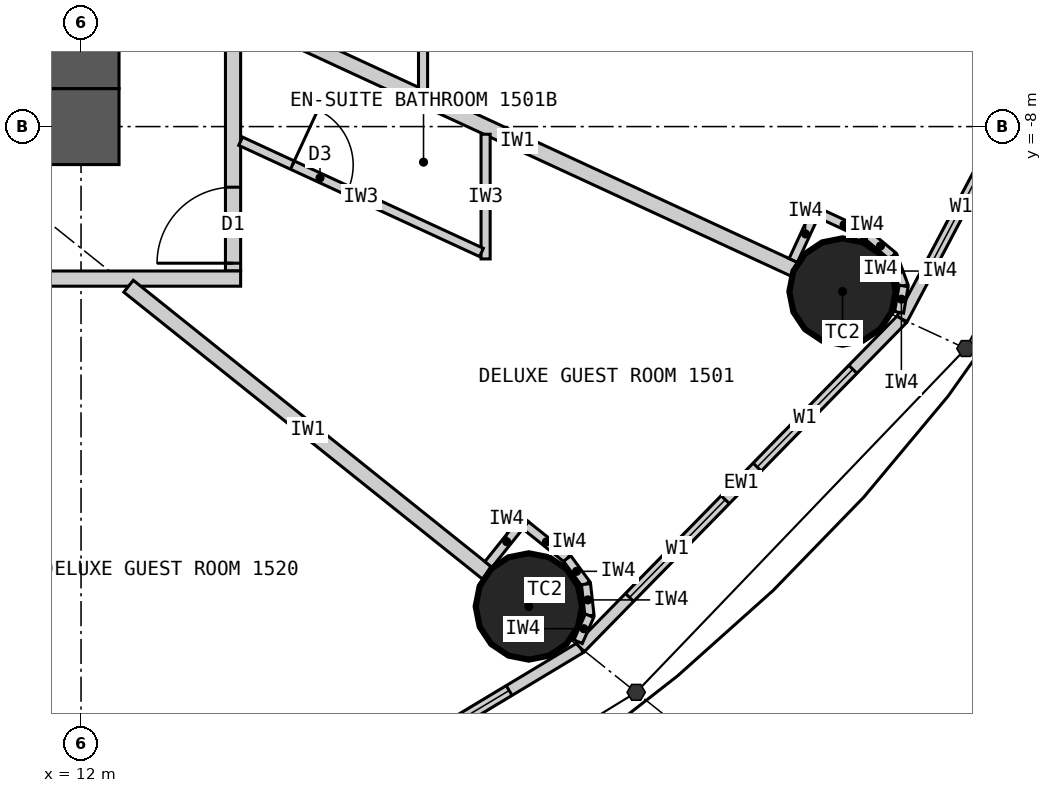
"""IFC4 building model, lengths in metres.
Left out: names, types, materials, properties, quantities, classifications, styles, units other than length and angle.
Written with IfcOpenShell. Run it as: python <this file> out.ifc"""

import sys

from ifc_helpers import new_model, si_unit, direction, frame, frame_2d, origin, origin_2d, place, context, subcontext, project, spatial, rectangle, circle, extrude, element, fill, save


model = new_model("IFC4")
c1 = context("Model", 3, precision=1e-05, world=origin(), true_north=direction((0.0, 1.0)))
c2 = subcontext(c1, "Body", "Model", "MODEL_VIEW")
j1 = project(units=[si_unit("LENGTHUNIT", "METRE"), si_unit("PLANEANGLEUNIT", "RADIAN")], contexts=[c1])
p1 = place(None, origin())
s1 = spatial("IfcSite", under=j1, at=p1, CompositionType="ELEMENT")
p2 = place(p1, origin())
s2 = spatial("IfcBuilding", under=s1, at=p2, CompositionType="ELEMENT")
p3 = place(p2, frame((0.0, 0.0, 63.9)))
s3 = spatial("IfcBuildingStorey", under=s2, at=p3, CompositionType="ELEMENT", Elevation=63.9)
for number, where, z_axis, x_axis in (
    (1, (17.892, -14.313, 0.0), (0.0, 0.0, 1.0), (1.0, 0.0, 0.0)),
    (2, (22.019, -10.17, 0.0), (0.0, 0.0, 1.0), (1.0, 0.0, 0.0)),
):
    element("IfcColumn", number, at=place(p3, frame(where, z_axis=z_axis, x_axis=x_axis)), inside=s3, PredefinedType="COLUMN", context=c2, shape_type="SweptSolid", body=[
        extrude(circle(Radius=0.7, at=origin_2d()), origin(), (0.0, 0.0, 1.0), 3.3),
    ])
p4 = place(p3, frame((12.5, -8.0, 0.0), z_axis=(0.0, 0.0, 1.0), x_axis=(-1.0, 0.0, 0.0)))
e3 = element("IfcWall", 3, at=p4, inside=s3, PredefinedType="SHEAR", context=c2, shape_type="SweptSolid", body=[
    extrude(rectangle(XDim=25.0, YDim=1.0, at=frame_2d((12.5, 0.0))), origin(), (0.0, 0.0, 1.0), 3.3),
])
p5 = place(p4, frame((11.2, 0.0, 0.0)))
e4 = element("IfcOpeningElement", 4, at=p5, cuts=e3, PredefinedType="OPENING", context=c2, shape_type="SweptSolid", body=[
    extrude(rectangle(XDim=1.2, YDim=2.2, at=frame_2d((0.6, 1.1))), frame((0.0, 0.51, 0.0), z_axis=(0.0, -1.0, 0.0), x_axis=(1.0, 0.0, 0.0)), (0.0, 0.0, 1.0), 1.02),
])
p6 = place(p4, frame((18.8, 0.0, 0.0)))
e5 = element("IfcOpeningElement", 5, at=p6, cuts=e3, PredefinedType="OPENING", context=c2, shape_type="SweptSolid", body=[
    extrude(rectangle(XDim=0.9, YDim=2.2, at=frame_2d((0.45, 1.1))), frame((0.0, 0.51, 0.0), z_axis=(0.0, -1.0, 0.0), x_axis=(1.0, 0.0, 0.0)), (0.0, 0.0, 1.0), 1.02),
])
p7 = place(p3, frame((12.0, -7.5, 0.0), z_axis=(0.0, 0.0, 1.0), x_axis=(0.0, 1.0, 0.0)))
e6 = element("IfcWall", 6, at=p7, inside=s3, PredefinedType="SHEAR", context=c2, shape_type="SweptSolid", body=[
    extrude(rectangle(XDim=15.0, YDim=1.0, at=frame_2d((7.5, 0.0))), origin(), (0.0, 0.0, 1.0), 3.3),
])
p8 = place(p7, frame((6.6, 0.0, 0.0)))
e7 = element("IfcOpeningElement", 7, at=p8, cuts=e6, PredefinedType="OPENING", context=c2, shape_type="SweptSolid", body=[
    extrude(rectangle(XDim=1.8, YDim=2.2, at=frame_2d((0.9, 1.1))), frame((0.0, 0.51, 0.0), z_axis=(0.0, -1.0, 0.0), x_axis=(1.0, 0.0, 0.0)), (0.0, 0.0, 1.0), 1.02),
])
p9 = place(p3, frame((13.096, -18.147, 0.0), z_axis=(0.0, 0.0, 1.0), x_axis=(0.856983180864, 0.515344377787, 0.0)))
e8 = element("IfcWall", 8, at=p9, inside=s3, PredefinedType="ELEMENTEDWALL", context=c2, shape_type="SweptSolid", body=[
    extrude(rectangle(XDim=6.386, YDim=0.15, at=frame_2d((3.193, 0.0))), origin(), (0.0, 0.0, 1.0), 3.12),
])
p10 = place(p9, frame((1.093, 0.0, 0.9)))
e9 = element("IfcOpeningElement", 9, at=p10, cuts=e8, PredefinedType="OPENING", context=c2, shape_type="SweptSolid", body=[
    extrude(rectangle(XDim=1.8, YDim=1.9, at=frame_2d((0.9, 0.95))), frame((0.0, 0.085, 0.0), z_axis=(0.0, -1.0, 0.0), x_axis=(1.0, 0.0, 0.0)), (0.0, 0.0, 1.0), 0.17),
])
p11 = place(p9, frame((3.493, 0.0, 0.9)))
e10 = element("IfcOpeningElement", 10, at=p11, cuts=e8, PredefinedType="OPENING", context=c2, shape_type="SweptSolid", body=[
    extrude(rectangle(XDim=1.8, YDim=1.9, at=frame_2d((0.9, 0.95))), frame((0.0, 0.085, 0.0), z_axis=(0.0, -1.0, 0.0), x_axis=(1.0, 0.0, 0.0)), (0.0, 0.0, 1.0), 0.17),
])
p12 = place(p3, frame((18.57, -14.856, 0.0), z_axis=(0.0, 0.0, 1.0), x_axis=(0.699602905915, 0.714531856557, 0.0)))
e11 = element("IfcWall", 11, at=p12, inside=s3, PredefinedType="ELEMENTEDWALL", context=c2, shape_type="SweptSolid", body=[
    extrude(rectangle(XDim=6.051, YDim=0.15, at=frame_2d((3.025, 0.0))), origin(), (0.0, 0.0, 1.0), 3.12),
])
p13 = place(p12, frame((0.926, 0.0, 0.9)))
e12 = element("IfcOpeningElement", 12, at=p13, cuts=e11, PredefinedType="OPENING", context=c2, shape_type="SweptSolid", body=[
    extrude(rectangle(XDim=1.8, YDim=1.9, at=frame_2d((0.9, 0.95))), frame((0.0, 0.085, 0.0), z_axis=(0.0, -1.0, 0.0), x_axis=(1.0, 0.0, 0.0)), (0.0, 0.0, 1.0), 0.17),
])
p14 = place(p12, frame((3.325, 0.0, 0.9)))
e13 = element("IfcOpeningElement", 13, at=p14, cuts=e11, PredefinedType="OPENING", context=c2, shape_type="SweptSolid", body=[
    extrude(rectangle(XDim=1.8, YDim=1.9, at=frame_2d((0.9, 0.95))), frame((0.0, 0.085, 0.0), z_axis=(0.0, -1.0, 0.0), x_axis=(1.0, 0.0, 0.0)), (0.0, 0.0, 1.0), 0.17),
])
p15 = place(p3, frame((22.803, -10.532, 0.0), z_axis=(0.0, 0.0, 1.0), x_axis=(0.467296867008, 0.884100468321, 0.0)))
e14 = element("IfcWall", 14, at=p15, inside=s3, PredefinedType="ELEMENTEDWALL", context=c2, shape_type="SweptSolid", body=[
    extrude(rectangle(XDim=5.734, YDim=0.15, at=frame_2d((2.867, 0.0))), origin(), (0.0, 0.0, 1.0), 3.12),
])
p16 = place(p15, frame((0.767, 0.0, 0.9)))
e15 = element("IfcOpeningElement", 15, at=p16, cuts=e14, PredefinedType="OPENING", context=c2, shape_type="SweptSolid", body=[
    extrude(rectangle(XDim=1.8, YDim=1.9, at=frame_2d((0.9, 0.95))), frame((0.0, 0.085, 0.0), z_axis=(0.0, -1.0, 0.0), x_axis=(1.0, 0.0, 0.0)), (0.0, 0.0, 1.0), 0.17),
])
p17 = place(p15, frame((3.167, 0.0, 0.9)))
e16 = element("IfcOpeningElement", 16, at=p17, cuts=e14, PredefinedType="OPENING", context=c2, shape_type="SweptSolid", body=[
    extrude(rectangle(XDim=1.8, YDim=1.9, at=frame_2d((0.9, 0.95))), frame((0.0, 0.085, 0.0), z_axis=(0.0, -1.0, 0.0), x_axis=(1.0, 0.0, 0.0)), (0.0, 0.0, 1.0), 0.17),
])
p18 = place(p3, frame((14.0, -9.9, 0.0), z_axis=(0.0, 0.0, 1.0), x_axis=(0.0, 1.0, 0.0)))
e17 = element("IfcWall", 17, at=p18, inside=s3, PredefinedType="PARTITIONING", context=c2, shape_type="SweptSolid", body=[
    extrude(rectangle(XDim=19.8, YDim=0.2, at=frame_2d((9.9, 0.0))), origin(), (0.0, 0.0, 1.0), 3.12),
])
p19 = place(p18, frame((0.103, 0.0, 0.0)))
e18 = element("IfcOpeningElement", 18, at=p19, cuts=e17, PredefinedType="OPENING", context=c2, shape_type="SweptSolid", body=[
    extrude(rectangle(XDim=1.0, YDim=2.2, at=frame_2d((0.5, 1.1))), frame((0.0, 0.11, 0.0), z_axis=(0.0, -1.0, 0.0), x_axis=(1.0, 0.0, 0.0)), (0.0, 0.0, 1.0), 0.22),
])
p20 = place(p18, frame((5.248, 0.0, 0.0)))
e19 = element("IfcOpeningElement", 19, at=p20, cuts=e17, PredefinedType="OPENING", context=c2, shape_type="SweptSolid", body=[
    extrude(rectangle(XDim=1.0, YDim=2.2, at=frame_2d((0.5, 1.1))), frame((0.0, 0.11, 0.0), z_axis=(0.0, -1.0, 0.0), x_axis=(1.0, 0.0, 0.0)), (0.0, 0.0, 1.0), 0.22),
])
p21 = place(p18, frame((8.438, 0.0, 0.0)))
e20 = element("IfcOpeningElement", 20, at=p21, cuts=e17, PredefinedType="OPENING", context=c2, shape_type="SweptSolid", body=[
    extrude(rectangle(XDim=1.0, YDim=2.2, at=frame_2d((0.5, 1.1))), frame((0.0, 0.11, 0.0), z_axis=(0.0, -1.0, 0.0), x_axis=(1.0, 0.0, 0.0)), (0.0, 0.0, 1.0), 0.22),
])
p22 = place(p18, frame((14.532, 0.0, 0.0)))
e21 = element("IfcOpeningElement", 21, at=p22, cuts=e17, PredefinedType="OPENING", context=c2, shape_type="SweptSolid", body=[
    extrude(rectangle(XDim=1.0, YDim=2.2, at=frame_2d((0.5, 1.1))), frame((0.0, 0.11, 0.0), z_axis=(0.0, -1.0, 0.0), x_axis=(1.0, 0.0, 0.0)), (0.0, 0.0, 1.0), 0.22),
])
p23 = place(p3, frame((14.1, -10.0, 0.0), z_axis=(0.0, 0.0, 1.0), x_axis=(-1.0, 0.0, 0.0)))
e22 = element("IfcWall", 22, at=p23, inside=s3, PredefinedType="PARTITIONING", context=c2, shape_type="SweptSolid", body=[
    extrude(rectangle(XDim=28.2, YDim=0.2, at=frame_2d((14.1, 0.0))), origin(), (0.0, 0.0, 1.0), 3.12),
])
p24 = place(p23, frame((23.865, 0.0, 0.0)))
e23 = element("IfcOpeningElement", 23, at=p24, cuts=e22, PredefinedType="OPENING", context=c2, shape_type="SweptSolid", body=[
    extrude(rectangle(XDim=1.0, YDim=2.2, at=frame_2d((0.5, 1.1))), frame((0.0, 0.11, 0.0), z_axis=(0.0, -1.0, 0.0), x_axis=(1.0, 0.0, 0.0)), (0.0, 0.0, 1.0), 0.22),
])
p25 = place(p23, frame((18.529, 0.0, 0.0)))
e24 = element("IfcOpeningElement", 24, at=p25, cuts=e22, PredefinedType="OPENING", context=c2, shape_type="SweptSolid", body=[
    extrude(rectangle(XDim=1.0, YDim=2.2, at=frame_2d((0.5, 1.1))), frame((0.0, 0.11, 0.0), z_axis=(0.0, -1.0, 0.0), x_axis=(1.0, 0.0, 0.0)), (0.0, 0.0, 1.0), 0.22),
])
p26 = place(p23, frame((14.623, 0.0, 0.0)))
e25 = element("IfcOpeningElement", 25, at=p26, cuts=e22, PredefinedType="OPENING", context=c2, shape_type="SweptSolid", body=[
    extrude(rectangle(XDim=1.0, YDim=2.2, at=frame_2d((0.5, 1.1))), frame((0.0, 0.11, 0.0), z_axis=(0.0, -1.0, 0.0), x_axis=(1.0, 0.0, 0.0)), (0.0, 0.0, 1.0), 0.22),
])
p27 = place(p23, frame((11.24, 0.0, 0.0)))
e26 = element("IfcOpeningElement", 26, at=p27, cuts=e22, PredefinedType="OPENING", context=c2, shape_type="SweptSolid", body=[
    extrude(rectangle(XDim=1.0, YDim=2.2, at=frame_2d((0.5, 1.1))), frame((0.0, 0.11, 0.0), z_axis=(0.0, -1.0, 0.0), x_axis=(1.0, 0.0, 0.0)), (0.0, 0.0, 1.0), 0.22),
])
p28 = place(p23, frame((8.671, 0.0, 0.0)))
e27 = element("IfcOpeningElement", 27, at=p28, cuts=e22, PredefinedType="OPENING", context=c2, shape_type="SweptSolid", body=[
    extrude(rectangle(XDim=1.0, YDim=2.2, at=frame_2d((0.5, 1.1))), frame((0.0, 0.11, 0.0), z_axis=(0.0, -1.0, 0.0), x_axis=(1.0, 0.0, 0.0)), (0.0, 0.0, 1.0), 0.22),
])
p29 = place(p23, frame((2.801, 0.0, 0.0)))
e28 = element("IfcOpeningElement", 28, at=p29, cuts=e22, PredefinedType="OPENING", context=c2, shape_type="SweptSolid", body=[
    extrude(rectangle(XDim=1.0, YDim=2.2, at=frame_2d((0.5, 1.1))), frame((0.0, 0.11, 0.0), z_axis=(0.0, -1.0, 0.0), x_axis=(1.0, 0.0, 0.0)), (0.0, 0.0, 1.0), 0.22),
])
p30 = place(p3, frame((7.289, -10.1, 0.0), z_axis=(0.0, 0.0, 1.0), x_axis=(0.585198353053, -0.810890182197, 0.0)))
e29 = element("IfcWall", 29, at=p30, inside=s3, PredefinedType="PARTITIONING", context=c2, shape_type="SweptSolid", body=[
    extrude(rectangle(XDim=8.36, YDim=0.2, at=frame_2d((4.18, 0.0))), origin(), (0.0, 0.0, 1.0), 2.32),
])
p31 = place(p3, frame((12.625, -10.1, 0.0), z_axis=(0.0, 0.0, 1.0), x_axis=(0.780892451574, -0.624665493744, 0.0)))
e30 = element("IfcWall", 30, at=p31, inside=s3, PredefinedType="PARTITIONING", context=c2, shape_type="SweptSolid", body=[
    extrude(rectangle(XDim=6.045, YDim=0.2, at=frame_2d((3.022, 0.0))), origin(), (0.0, 0.0, 1.0), 2.32),
])
p32 = place(p3, frame((14.1, -6.512, 0.0), z_axis=(0.0, 0.0, 1.0), x_axis=(0.907832871056, -0.419332181247, 0.0)))
e31 = element("IfcWall", 31, at=p32, inside=s3, PredefinedType="PARTITIONING", context=c2, shape_type="SweptSolid", body=[
    extrude(rectangle(XDim=8.023, YDim=0.2, at=frame_2d((4.011, 0.0))), origin(), (0.0, 0.0, 1.0), 2.32),
])
p33 = place(p3, frame((17.323, -8.101, 0.0), z_axis=(0.0, 0.0, 1.0), x_axis=(0.0, -1.0, 0.0)))
e32 = element("IfcWall", 32, at=p33, inside=s3, PredefinedType="PARTITIONING", context=c2, shape_type="SweptSolid", body=[
    extrude(rectangle(XDim=1.64, YDim=0.12, at=frame_2d((0.82, 0.0))), origin(), (0.0, 0.0, 1.0), 3.12),
])
p34 = place(p3, frame((14.1, -8.193, 0.0), z_axis=(0.0, 0.0, 1.0), x_axis=(0.907836493557, -0.419324338628, 0.0)))
e33 = element("IfcWall", 33, at=p34, inside=s3, PredefinedType="PARTITIONING", context=c2, shape_type="SweptSolid", body=[
    extrude(rectangle(XDim=3.49, YDim=0.12, at=frame_2d((1.745, 0.0))), origin(), (0.0, 0.0, 1.0), 3.12),
])
p35 = place(p34, frame((0.75, 0.0, 0.0)))
e34 = element("IfcOpeningElement", 34, at=p35, cuts=e33, PredefinedType="OPENING", context=c2, shape_type="SweptSolid", body=[
    extrude(rectangle(XDim=0.8, YDim=2.1, at=frame_2d((0.4, 1.05))), frame((0.0, 0.07, 0.0), z_axis=(0.0, -1.0, 0.0), x_axis=(1.0, 0.0, 0.0)), (0.0, 0.0, 1.0), 0.14),
])
p36 = place(p3, frame((16.5, -7.521, 0.0), z_axis=(0.0, 0.0, 1.0), x_axis=(0.0, 1.0, 0.0)))
e35 = element("IfcWall", 35, at=p36, inside=s3, PredefinedType="PARTITIONING", context=c2, shape_type="SweptSolid", body=[
    extrude(rectangle(XDim=2.749, YDim=0.12, at=frame_2d((1.374, 0.0))), origin(), (0.0, 0.0, 1.0), 3.12),
])
p37 = place(p3, frame((17.361, -13.76, 0.0), z_axis=(0.0, 0.0, 1.0), x_axis=(0.624501042889, 0.781023973659, 0.0)))
e36 = element("IfcWall", 36, at=p37, inside=s3, PredefinedType="PARTITIONING", context=c2, shape_type="SweptSolid", body=[
    extrude(rectangle(XDim=0.767, YDim=0.12, at=frame_2d((0.384, 0.0))), origin(), (0.0, 0.0, 1.0), 3.12),
])
p38 = place(p3, frame((17.85, -13.246, 0.0), z_axis=(0.0, 0.0, 1.0), x_axis=(0.780902834923, -0.62465251333, 0.0)))
e37 = element("IfcWall", 37, at=p38, inside=s3, PredefinedType="PARTITIONING", context=c2, shape_type="SweptSolid", body=[
    extrude(rectangle(XDim=0.7, YDim=0.12, at=frame_2d((0.35, 0.0))), origin(), (0.0, 0.0, 1.0), 3.12),
])
for number, where, z_axis, x_axis in (
    (38, (18.396, -13.683, 0.0), (0.0, 0.0, 1.0), (0.592, -0.806, 0.0)),
    (39, (18.644, -14.02, 0.0), (0.0, 0.0, 1.0), (0.11, -0.994, 0.0)),
):
    element("IfcWall", number, at=place(p3, frame(where, z_axis=z_axis, x_axis=x_axis)), inside=s3, PredefinedType="PARTITIONING", context=c2, shape_type="SweptSolid", body=[
        extrude(rectangle(XDim=0.418, YDim=0.12, at=frame_2d((0.209, 0.0))), origin(), (0.0, 0.0, 1.0), 3.12),
    ])
p39 = place(p3, frame((18.69, -14.435, 0.0), z_axis=(0.0, 0.0, 1.0), x_axis=(-0.401093412634, -0.91603715773, 0.0)))
e40 = element("IfcWall", 40, at=p39, inside=s3, PredefinedType="PARTITIONING", context=c2, shape_type="SweptSolid", body=[
    extrude(rectangle(XDim=0.373, YDim=0.12, at=frame_2d((0.187, 0.0))), origin(), (0.0, 0.0, 1.0), 3.12),
])
p40 = place(p3, frame((21.371, -9.761, 0.0), z_axis=(0.0, 0.0, 1.0), x_axis=(0.419259891039, 0.907866258744, 0.0)))
e41 = element("IfcWall", 41, at=p40, inside=s3, PredefinedType="PARTITIONING", context=c2, shape_type="SweptSolid", body=[
    extrude(rectangle(XDim=0.768, YDim=0.12, at=frame_2d((0.384, 0.0))), origin(), (0.0, 0.0, 1.0), 3.12),
])
p41 = place(p3, frame((21.722, -9.144, 0.0), z_axis=(0.0, 0.0, 1.0), x_axis=(0.907877701396, -0.419235112208, 0.0)))
e42 = element("IfcWall", 42, at=p41, inside=s3, PredefinedType="PARTITIONING", context=c2, shape_type="SweptSolid", body=[
    extrude(rectangle(XDim=0.7, YDim=0.12, at=frame_2d((0.35, 0.0))), origin(), (0.0, 0.0, 1.0), 3.12),
])
p42 = place(p3, frame((22.358, -9.437, 0.0), z_axis=(0.0, 0.0, 1.0), x_axis=(0.768412687942, -0.639954639806, 0.0)))
e43 = element("IfcWall", 43, at=p42, inside=s3, PredefinedType="PARTITIONING", context=c2, shape_type="SweptSolid", body=[
    extrude(rectangle(XDim=0.418, YDim=0.12, at=frame_2d((0.209, 0.0))), origin(), (0.0, 0.0, 1.0), 3.12),
])
p43 = place(p3, frame((22.679, -9.705, 0.0), z_axis=(0.0, 0.0, 1.0), x_axis=(0.345164001646, -0.938542386879, 0.0)))
e44 = element("IfcWall", 44, at=p43, inside=s3, PredefinedType="PARTITIONING", context=c2, shape_type="SweptSolid", body=[
    extrude(rectangle(XDim=0.418, YDim=0.12, at=frame_2d((0.209, 0.0))), origin(), (0.0, 0.0, 1.0), 3.12),
])
p44 = place(p3, frame((22.823, -10.097, 0.0), z_axis=(0.0, 0.0, 1.0), x_axis=(-0.169674995186, -0.985500074079, 0.0)))
e45 = element("IfcWall", 45, at=p44, inside=s3, PredefinedType="PARTITIONING", context=c2, shape_type="SweptSolid", body=[
    extrude(rectangle(XDim=0.353, YDim=0.12, at=frame_2d((0.176, 0.0))), origin(), (0.0, 0.0, 1.0), 3.12),
])
p45 = place(p11, origin())
e46 = element("IfcWindow", 46, at=p45, inside=s3, PartitioningType="SINGLE_PANEL", PredefinedType="WINDOW", context=c2, shape_type="SweptSolid", body=[
    extrude(rectangle(XDim=1.8, YDim=1.9, at=frame_2d((0.9, 0.95))), frame((0.0, 0.03, 0.0), z_axis=(0.0, -1.0, 0.0), x_axis=(1.0, 0.0, 0.0)), (0.0, 0.0, 1.0), 0.06),
])
fill(e10, e46)
p46 = place(p13, origin())
e47 = element("IfcWindow", 47, at=p46, inside=s3, PartitioningType="SINGLE_PANEL", PredefinedType="WINDOW", context=c2, shape_type="SweptSolid", body=[
    extrude(rectangle(XDim=1.8, YDim=1.9, at=frame_2d((0.9, 0.95))), frame((0.0, 0.03, 0.0), z_axis=(0.0, -1.0, 0.0), x_axis=(1.0, 0.0, 0.0)), (0.0, 0.0, 1.0), 0.06),
])
fill(e12, e47)
p47 = place(p14, origin())
e48 = element("IfcWindow", 48, at=p47, inside=s3, PartitioningType="SINGLE_PANEL", PredefinedType="WINDOW", context=c2, shape_type="SweptSolid", body=[
    extrude(rectangle(XDim=1.8, YDim=1.9, at=frame_2d((0.9, 0.95))), frame((0.0, 0.03, 0.0), z_axis=(0.0, -1.0, 0.0), x_axis=(1.0, 0.0, 0.0)), (0.0, 0.0, 1.0), 0.06),
])
fill(e13, e48)
p48 = place(p16, origin())
e49 = element("IfcWindow", 49, at=p48, inside=s3, PartitioningType="SINGLE_PANEL", PredefinedType="WINDOW", context=c2, shape_type="SweptSolid", body=[
    extrude(rectangle(XDim=1.8, YDim=1.9, at=frame_2d((0.9, 0.95))), frame((0.0, 0.03, 0.0), z_axis=(0.0, -1.0, 0.0), x_axis=(1.0, 0.0, 0.0)), (0.0, 0.0, 1.0), 0.06),
])
fill(e15, e49)
p49 = place(p35, origin())
e50 = element("IfcDoor", 50, at=p49, inside=s3, OperationType="SINGLE_SWING_LEFT", PredefinedType="DOOR", context=c2, shape_type="SweptSolid", body=[
    extrude(rectangle(XDim=0.8, YDim=2.1, at=frame_2d((0.4, 1.05))), frame((0.0, 0.025, 0.0), z_axis=(0.0, -1.0, 0.0), x_axis=(1.0, 0.0, 0.0)), (0.0, 0.0, 1.0), 0.05),
])
fill(e34, e50)
p50 = place(p19, origin())
e51 = element("IfcDoor", 51, at=p50, inside=s3, OperationType="SINGLE_SWING_LEFT", PredefinedType="DOOR", context=c2, shape_type="SweptSolid", body=[
    extrude(rectangle(XDim=1.0, YDim=2.2, at=frame_2d((0.5, 1.1))), frame((0.0, 0.025, 0.0), z_axis=(0.0, -1.0, 0.0), x_axis=(1.0, 0.0, 0.0)), (0.0, 0.0, 1.0), 0.05),
])
fill(e18, e51)
save(model, sys.argv[1])
